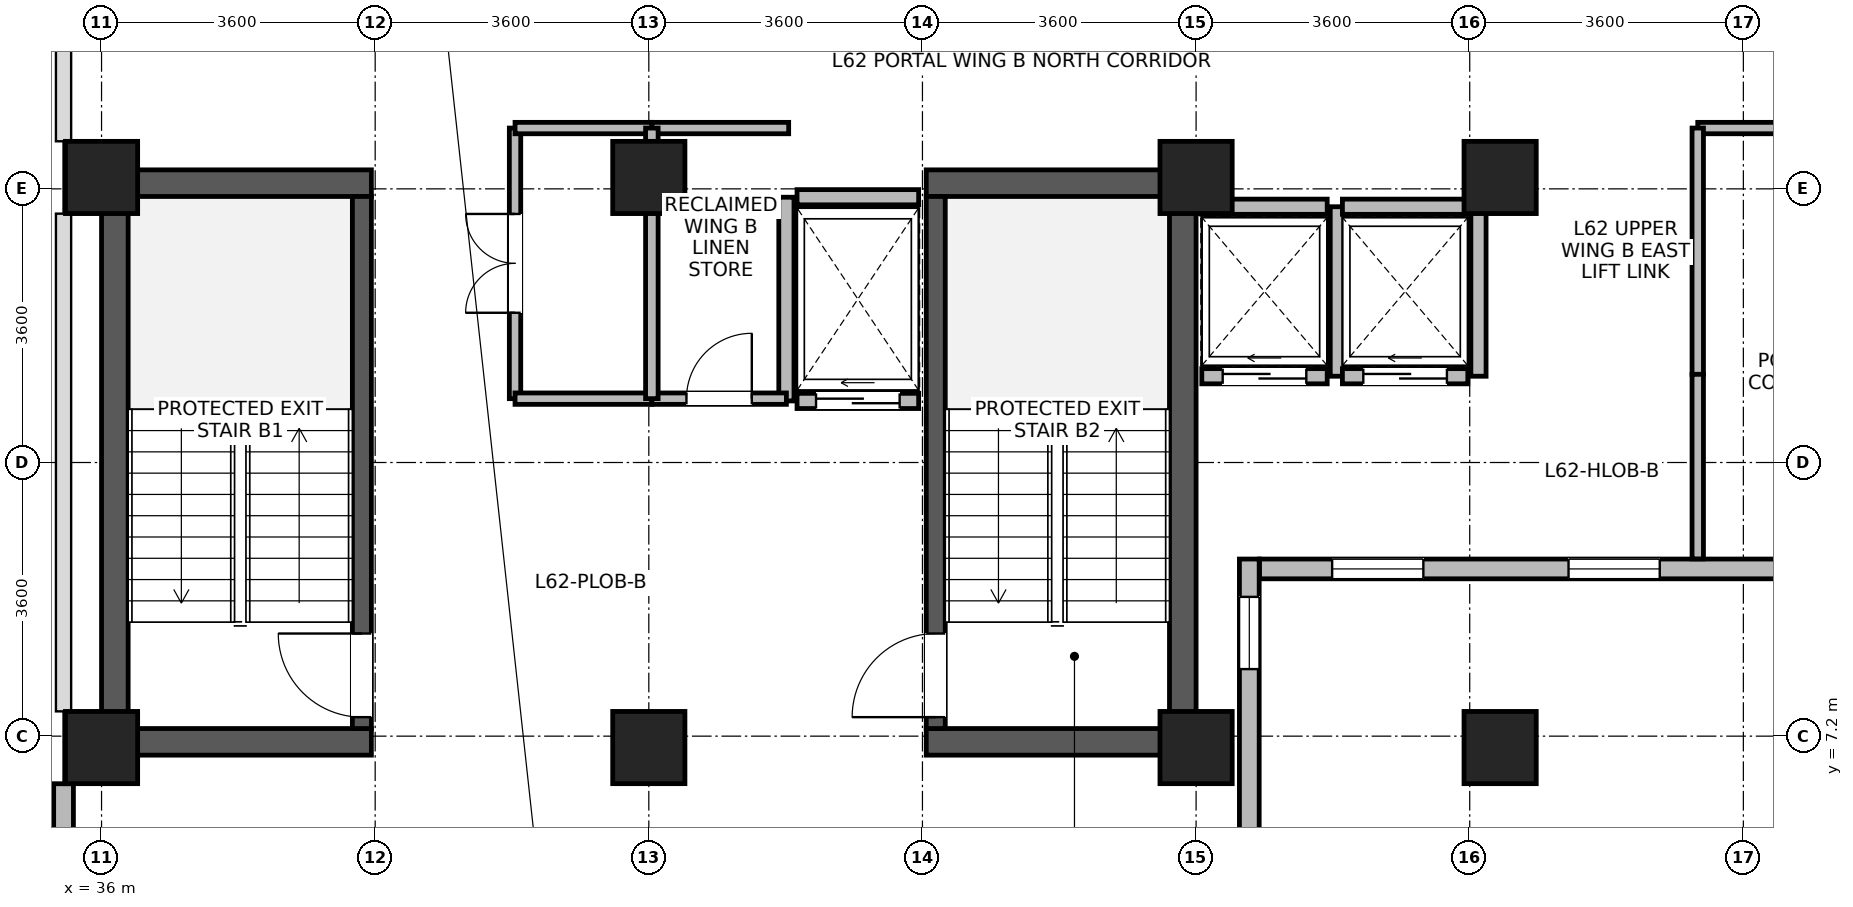
"""IFC4 building model, lengths in metres.
Left out: names, types, materials, properties, quantities, classifications, styles, units other than length and angle.
Written with IfcOpenShell. Run it as: python <this file> out.ifc"""

import sys

from ifc_helpers import new_model, si_unit, direction, frame, frame_2d, origin, origin_2d, place, context, subcontext, project, spatial, rectangle, extrude, source, transform, mapped, element, fill, save


model = new_model("IFC4")
c1 = context("Model", 3, precision=1e-05, world=origin(), true_north=direction((0.0, 1.0)))
c2 = subcontext(c1, "Body", "Model", "MODEL_VIEW")
j1 = project(units=[si_unit("LENGTHUNIT", "METRE"), si_unit("PLANEANGLEUNIT", "RADIAN")], contexts=[c1])
p1 = place(None, origin())
s1 = spatial("IfcSite", under=j1, at=p1, CompositionType="ELEMENT")
p2 = place(p1, origin())
s2 = spatial("IfcBuilding", under=s1, at=p2, CompositionType="ELEMENT")
p3 = place(p2, frame((0.0, 0.0, 242.5)))
s3 = spatial("IfcBuildingStorey", under=s2, at=p3, CompositionType="ELEMENT", Elevation=242.5)
for number, where, z_axis, x_axis in (
    (1, (36.175, 6.95, 0.0), (0.0, 0.0, 1.0), (0.0, 1.0, 0.0)),
    (2, (50.225, 6.95, 0.0), (0.0, 0.0, 1.0), (0.0, 1.0, 0.0)),
):
    element("IfcWall", number, at=place(p3, frame(where, z_axis=z_axis, x_axis=x_axis)), inside=s3, PredefinedType="SHEAR", context=c2, shape_type="SweptSolid", body=[
        extrude(rectangle(XDim=7.7, YDim=0.35, at=frame_2d((3.85, 0.0))), origin(), (0.0, 0.0, 1.0), 3.44),
    ])
for number, where, z_axis, x_axis in (
    (3, (36.35, 7.125, 0.0), (0.0, 0.0, 1.0), (1.0, 0.0, 0.0)),
    (4, (46.85, 7.125, 0.0), (0.0, 0.0, 1.0), (1.0, 0.0, 0.0)),
    (5, (36.35, 14.475, 0.0), (0.0, 0.0, 1.0), (1.0, 0.0, 0.0)),
    (6, (46.85, 14.475, 0.0), (0.0, 0.0, 1.0), (1.0, 0.0, 0.0)),
):
    element("IfcWall", number, at=place(p3, frame(where, z_axis=z_axis, x_axis=x_axis)), inside=s3, PredefinedType="SHEAR", context=c2, shape_type="SweptSolid", body=[
        extrude(rectangle(XDim=3.2, YDim=0.35, at=frame_2d((1.6, 0.0))), origin(), (0.0, 0.0, 1.0), 3.44),
    ])
p4 = place(p3, frame((39.425, 7.3, 0.0), z_axis=(0.0, 0.0, 1.0), x_axis=(0.0, 1.0, 0.0)))
e7 = element("IfcWall", 7, at=p4, inside=s3, PredefinedType="SHEAR", context=c2, shape_type="SweptSolid", body=[
    extrude(rectangle(XDim=7.0, YDim=0.25, at=frame_2d((3.5, 0.0))), origin(), (0.0, 0.0, 1.0), 3.44),
])
p5 = place(p4, frame((0.15, 0.0, 0.0)))
e8 = element("IfcOpeningElement", 8, at=p5, cuts=e7, PredefinedType="OPENING", context=c2, shape_type="SweptSolid", body=[
    extrude(rectangle(XDim=1.1, YDim=2.08, at=frame_2d((0.55, 1.04))), frame((0.0, 0.135, 0.0), z_axis=(0.0, -1.0, 0.0), x_axis=(1.0, 0.0, 0.0)), (0.0, 0.0, 1.0), 0.27),
])
p6 = place(p3, frame((46.975, 7.3, 0.0), z_axis=(0.0, 0.0, 1.0), x_axis=(0.0, 1.0, 0.0)))
e9 = element("IfcWall", 9, at=p6, inside=s3, PredefinedType="SHEAR", context=c2, shape_type="SweptSolid", body=[
    extrude(rectangle(XDim=7.0, YDim=0.25, at=frame_2d((3.5, 0.0))), origin(), (0.0, 0.0, 1.0), 3.44),
])
p7 = place(p6, frame((0.15, 0.0, 0.0)))
e10 = element("IfcOpeningElement", 10, at=p7, cuts=e9, PredefinedType="OPENING", context=c2, shape_type="SweptSolid", body=[
    extrude(rectangle(XDim=1.1, YDim=2.08, at=frame_2d((0.55, 1.04))), frame((0.0, 0.135, 0.0), z_axis=(0.0, -1.0, 0.0), x_axis=(1.0, 0.0, 0.0)), (0.0, 0.0, 1.0), 0.27),
])
m1 = source(origin(), c2, "Body", "SweptSolid", [
    extrude(rectangle(XDim=0.95, YDim=0.95, at=origin_2d()), origin(), (0.0, 0.0, 1.0), 3.7),
])
for number, where, z_axis, x_axis in (
    (11, (36.0, 7.05, 0.0), (0.0, 0.0, 1.0), (1.0, 0.0, 0.0)),
    (12, (36.0, 14.55, 0.0), (0.0, 0.0, 1.0), (1.0, 0.0, 0.0)),
    (13, (43.2, 7.05, 0.0), (0.0, 0.0, 1.0), (1.0, 0.0, 0.0)),
    (14, (43.2, 14.55, 0.0), (0.0, 0.0, 1.0), (1.0, 0.0, 0.0)),
    (15, (50.4, 7.05, 0.0), (0.0, 0.0, 1.0), (1.0, 0.0, 0.0)),
    (16, (50.4, 14.55, 0.0), (0.0, 0.0, 1.0), (1.0, 0.0, 0.0)),
    (17, (54.4, 7.05, 0.0), (0.0, 0.0, 1.0), (1.0, 0.0, 0.0)),
    (18, (54.4, 14.55, 0.0), (0.0, 0.0, 1.0), (1.0, 0.0, 0.0)),
):
    element("IfcColumn", number, at=place(p3, frame(where, z_axis=z_axis, x_axis=x_axis)), inside=s3, PredefinedType="COLUMN", context=c2, shape_type="MappedRepresentation", body=[
        mapped(m1, transform((0.0, 0.0, 0.0), x_axis=(1.0, 0.0, 0.0), y_axis=(0.0, 1.0, 0.0), z_axis=(0.0, 0.0, 1.0), scale=1.0)),
    ])
p8 = place(p3, frame((51.1, 9.53, 0.0), z_axis=(0.0, 0.0, 1.0), x_axis=(0.0, -1.0, 0.0)))
e19 = element("IfcWall", 19, at=p8, inside=s3, PredefinedType="STANDARD", context=c2, shape_type="SweptSolid", body=[
    extrude(rectangle(XDim=3.86, YDim=0.26, at=frame_2d((1.93, 0.0))), origin(), (0.0, 0.0, 1.0), 3.42),
])
p9 = place(p8, frame((0.498, 0.0, 0.85)))
e20 = element("IfcOpeningElement", 20, at=p9, cuts=e19, PredefinedType="OPENING", context=c2, shape_type="SweptSolid", body=[
    extrude(rectangle(XDim=0.95, YDim=1.75, at=frame_2d((0.475, 0.875))), frame((0.0, 0.14, 0.0), z_axis=(0.0, -1.0, 0.0), x_axis=(1.0, 0.0, 0.0)), (0.0, 0.0, 1.0), 0.28),
])
p10 = place(p3, frame((60.565, 9.4, 0.0), z_axis=(0.0, 0.0, 1.0), x_axis=(-1.0, 0.0, 0.0)))
e21 = element("IfcWall", 21, at=p10, inside=s3, PredefinedType="STANDARD", context=c2, shape_type="SweptSolid", body=[
    extrude(rectangle(XDim=9.33, YDim=0.26, at=frame_2d((4.665, 0.0))), origin(), (0.0, 0.0, 1.0), 3.42),
])
p11 = place(p10, frame((0.955, 0.0, 0.85)))
e22 = element("IfcOpeningElement", 22, at=p11, cuts=e21, PredefinedType="OPENING", context=c2, shape_type="SweptSolid", body=[
    extrude(rectangle(XDim=1.2, YDim=1.75, at=frame_2d((0.6, 0.875))), frame((0.0, 0.14, 0.0), z_axis=(0.0, -1.0, 0.0), x_axis=(1.0, 0.0, 0.0)), (0.0, 0.0, 1.0), 0.28),
])
p12 = place(p10, frame((4.065, 0.0, 0.85)))
e23 = element("IfcOpeningElement", 23, at=p12, cuts=e21, PredefinedType="OPENING", context=c2, shape_type="SweptSolid", body=[
    extrude(rectangle(XDim=1.2, YDim=1.75, at=frame_2d((0.6, 0.875))), frame((0.0, 0.14, 0.0), z_axis=(0.0, -1.0, 0.0), x_axis=(1.0, 0.0, 0.0)), (0.0, 0.0, 1.0), 0.28),
])
p13 = place(p10, frame((7.175, 0.0, 0.85)))
e24 = element("IfcOpeningElement", 24, at=p13, cuts=e21, PredefinedType="OPENING", context=c2, shape_type="SweptSolid", body=[
    extrude(rectangle(XDim=1.2, YDim=1.75, at=frame_2d((0.6, 0.875))), frame((0.0, 0.14, 0.0), z_axis=(0.0, -1.0, 0.0), x_axis=(1.0, 0.0, 0.0)), (0.0, 0.0, 1.0), 0.28),
])
p14 = place(p3, frame((35.5, 5.8, 0.0), z_axis=(0.0, 0.0, 1.0), x_axis=(0.0, 1.0, 0.0)))
e25 = element("IfcWall", 25, at=p14, inside=s3, PredefinedType="STANDARD", context=c2, shape_type="SweptSolid", body=[
    extrude(rectangle(XDim=0.774, YDim=0.26, at=frame_2d((0.387, 0.0))), origin(), (0.0, 0.0, 1.0), 3.44),
])
p15 = place(p3, frame((50.475, 11.935, 0.0), z_axis=(0.0, 0.0, 1.0), x_axis=(1.0, 0.0, 0.0)))
e26 = element("IfcWall", 26, at=p15, inside=s3, PredefinedType="PARTITIONING", context=c2, shape_type="SweptSolid", body=[
    extrude(rectangle(XDim=1.65, YDim=0.2, at=frame_2d((0.825, 0.0))), origin(), (0.0, 0.0, 1.0), 3.42),
])
p16 = place(p15, frame((0.275, 0.0, 0.0)))
e27 = element("IfcOpeningElement", 27, at=p16, cuts=e26, PredefinedType="OPENING", context=c2, shape_type="SweptSolid", body=[
    extrude(rectangle(XDim=1.1, YDim=2.12, at=frame_2d((0.55, 1.06))), frame((0.0, 0.11, 0.0), z_axis=(0.0, -1.0, 0.0), x_axis=(1.0, 0.0, 0.0)), (0.0, 0.0, 1.0), 0.22),
])
p17 = place(p3, frame((50.475, 14.165, 0.0), z_axis=(0.0, 0.0, 1.0), x_axis=(1.0, 0.0, 0.0)))
e28 = element("IfcWall", 28, at=p17, inside=s3, PredefinedType="PARTITIONING", context=c2, shape_type="SweptSolid", body=[
    extrude(rectangle(XDim=1.65, YDim=0.2, at=frame_2d((0.825, 0.0))), origin(), (0.0, 0.0, 1.0), 3.42),
])
p18 = place(p3, frame((52.265, 11.935, 0.0), z_axis=(0.0, 0.0, 1.0), x_axis=(0.0, 1.0, 0.0)))
e29 = element("IfcWall", 29, at=p18, inside=s3, PredefinedType="PARTITIONING", context=c2, shape_type="SweptSolid", body=[
    extrude(rectangle(XDim=2.23, YDim=0.2, at=frame_2d((1.115, 0.0))), origin(), (0.0, 0.0, 1.0), 3.42),
])
p19 = place(p3, frame((52.325, 11.935, 0.0), z_axis=(0.0, 0.0, 1.0), x_axis=(1.0, 0.0, 0.0)))
e30 = element("IfcWall", 30, at=p19, inside=s3, PredefinedType="PARTITIONING", context=c2, shape_type="SweptSolid", body=[
    extrude(rectangle(XDim=1.65, YDim=0.2, at=frame_2d((0.825, 0.0))), origin(), (0.0, 0.0, 1.0), 3.42),
])
p20 = place(p19, frame((0.275, 0.0, 0.0)))
e31 = element("IfcOpeningElement", 31, at=p20, cuts=e30, PredefinedType="OPENING", context=c2, shape_type="SweptSolid", body=[
    extrude(rectangle(XDim=1.1, YDim=2.12, at=frame_2d((0.55, 1.06))), frame((0.0, 0.11, 0.0), z_axis=(0.0, -1.0, 0.0), x_axis=(1.0, 0.0, 0.0)), (0.0, 0.0, 1.0), 0.22),
])
p21 = place(p3, frame((52.325, 14.165, 0.0), z_axis=(0.0, 0.0, 1.0), x_axis=(1.0, 0.0, 0.0)))
e32 = element("IfcWall", 32, at=p21, inside=s3, PredefinedType="PARTITIONING", context=c2, shape_type="SweptSolid", body=[
    extrude(rectangle(XDim=1.65, YDim=0.2, at=frame_2d((0.825, 0.0))), origin(), (0.0, 0.0, 1.0), 3.42),
])
p22 = place(p3, frame((54.115, 11.935, 0.0), z_axis=(0.0, 0.0, 1.0), x_axis=(0.0, 1.0, 0.0)))
e33 = element("IfcWall", 33, at=p22, inside=s3, PredefinedType="PARTITIONING", context=c2, shape_type="SweptSolid", body=[
    extrude(rectangle(XDim=2.23, YDim=0.2, at=frame_2d((1.115, 0.0))), origin(), (0.0, 0.0, 1.0), 3.42),
])
p23 = place(p3, frame((45.15, 11.61, 0.0), z_axis=(0.0, 0.0, 1.0), x_axis=(1.0, 0.0, 0.0)))
e34 = element("IfcWall", 34, at=p23, inside=s3, PredefinedType="PARTITIONING", context=c2, shape_type="SweptSolid", body=[
    extrude(rectangle(XDim=1.6, YDim=0.2, at=frame_2d((0.8, 0.0))), origin(), (0.0, 0.0, 1.0), 3.42),
])
p24 = place(p23, frame((0.25, 0.0, 0.0)))
e35 = element("IfcOpeningElement", 35, at=p24, cuts=e34, PredefinedType="OPENING", context=c2, shape_type="SweptSolid", body=[
    extrude(rectangle(XDim=1.1, YDim=2.12, at=frame_2d((0.55, 1.06))), frame((0.0, 0.11, 0.0), z_axis=(0.0, -1.0, 0.0), x_axis=(1.0, 0.0, 0.0)), (0.0, 0.0, 1.0), 0.22),
])
p25 = place(p3, frame((45.15, 14.29, 0.0), z_axis=(0.0, 0.0, 1.0), x_axis=(1.0, 0.0, 0.0)))
e36 = element("IfcWall", 36, at=p25, inside=s3, PredefinedType="PARTITIONING", context=c2, shape_type="SweptSolid", body=[
    extrude(rectangle(XDim=1.6, YDim=0.2, at=frame_2d((0.8, 0.0))), origin(), (0.0, 0.0, 1.0), 2.52),
])
p26 = place(p3, frame((45.01, 11.61, 0.0), z_axis=(0.0, 0.0, 1.0), x_axis=(0.0, 1.0, 0.0)))
e37 = element("IfcWall", 37, at=p26, inside=s3, PredefinedType="PARTITIONING", context=c2, shape_type="SweptSolid", body=[
    extrude(rectangle(XDim=2.68, YDim=0.2, at=frame_2d((1.34, 0.0))), origin(), (0.0, 0.0, 1.0), 3.42),
])
p27 = place(p3, frame((57.0, 15.2, 0.0), z_axis=(0.0, 0.0, 1.0), x_axis=(1.0, 0.0, 0.0)))
e38 = element("IfcWall", 38, at=p27, inside=s3, PredefinedType="PARTITIONING", context=c2, shape_type="SweptSolid", body=[
    extrude(rectangle(XDim=3.568, YDim=0.15, at=frame_2d((1.784, 0.0))), origin(), (0.0, 0.0, 1.0), 3.42),
])
p28 = place(p27, frame((1.309, 0.0, 0.0)))
e39 = element("IfcOpeningElement", 39, at=p28, cuts=e38, PredefinedType="OPENING", context=c2, shape_type="SweptSolid", body=[
    extrude(rectangle(XDim=0.95, YDim=2.1, at=frame_2d((0.475, 1.05))), frame((0.0, 0.085, 0.0), z_axis=(0.0, -1.0, 0.0), x_axis=(1.0, 0.0, 0.0)), (0.0, 0.0, 1.0), 0.17),
])
p29 = place(p3, frame((41.44, 11.64, 0.0), z_axis=(0.0, 0.0, 1.0), x_axis=(0.0, 1.0, 0.0)))
e40 = element("IfcWall", 40, at=p29, inside=s3, PredefinedType="PARTITIONING", context=c2, shape_type="SweptSolid", body=[
    extrude(rectangle(XDim=3.56, YDim=0.15, at=frame_2d((1.78, 0.0))), origin(), (0.0, 0.0, 1.0), 3.42),
])
p30 = place(p29, frame((1.13, 0.0, 0.0)))
e41 = element("IfcOpeningElement", 41, at=p30, cuts=e40, PredefinedType="OPENING", context=c2, shape_type="SweptSolid", body=[
    extrude(rectangle(XDim=1.3, YDim=2.12, at=frame_2d((0.65, 1.06))), frame((0.0, 0.085, 0.0), z_axis=(0.0, -1.0, 0.0), x_axis=(1.0, 0.0, 0.0)), (0.0, 0.0, 1.0), 0.17),
])
p31 = place(p3, frame((57.0, 11.96, 0.0), z_axis=(0.0, 0.0, 1.0), x_axis=(0.0, 1.0, 0.0)))
e42 = element("IfcWall", 42, at=p31, inside=s3, PredefinedType="PARTITIONING", context=c2, shape_type="SweptSolid", body=[
    extrude(rectangle(XDim=3.24, YDim=0.15, at=frame_2d((1.62, 0.0))), origin(), (0.0, 0.0, 1.0), 3.42),
])
p32 = place(p3, frame((57.0, 9.532, 0.0), z_axis=(0.0, 0.0, 1.0), x_axis=(0.0, 1.0, 0.0)))
e43 = element("IfcWall", 43, at=p32, inside=s3, PredefinedType="PARTITIONING", context=c2, shape_type="SweptSolid", body=[
    extrude(rectangle(XDim=2.428, YDim=0.15, at=frame_2d((1.214, 0.0))), origin(), (0.0, 0.0, 1.0), 3.42),
])
for number, where, z_axis, x_axis in (
    (44, (41.44, 11.64, 0.0), (0.0, 0.0, 1.0), (1.0, 0.0, 0.0)),
    (45, (41.44, 15.2, 0.0), (0.0, 0.0, 1.0), (1.0, 0.0, 0.0)),
):
    element("IfcWall", number, at=place(p3, frame(where, z_axis=z_axis, x_axis=x_axis)), inside=s3, PredefinedType="PARTITIONING", context=c2, shape_type="SweptSolid", body=[
        extrude(rectangle(XDim=1.8, YDim=0.15, at=frame_2d((0.9, 0.0))), origin(), (0.0, 0.0, 1.0), 3.42),
    ])
p33 = place(p3, frame((43.24, 11.64, 0.0), z_axis=(0.0, 0.0, 1.0), x_axis=(1.0, 0.0, 0.0)))
e46 = element("IfcWall", 46, at=p33, inside=s3, PredefinedType="PARTITIONING", context=c2, shape_type="SweptSolid", body=[
    extrude(rectangle(XDim=1.77, YDim=0.15, at=frame_2d((0.885, 0.0))), origin(), (0.0, 0.0, 1.0), 3.42),
])
p34 = place(p33, frame((0.455, 0.0, 0.0)))
e47 = element("IfcOpeningElement", 47, at=p34, cuts=e46, PredefinedType="OPENING", context=c2, shape_type="SweptSolid", body=[
    extrude(rectangle(XDim=0.86, YDim=2.02, at=frame_2d((0.43, 1.01))), frame((0.0, 0.085, 0.0), z_axis=(0.0, -1.0, 0.0), x_axis=(1.0, 0.0, 0.0)), (0.0, 0.0, 1.0), 0.17),
])
p35 = place(p3, frame((43.24, 15.2, 0.0), z_axis=(0.0, 0.0, 1.0), x_axis=(1.0, 0.0, 0.0)))
e48 = element("IfcWall", 48, at=p35, inside=s3, PredefinedType="PARTITIONING", context=c2, shape_type="SweptSolid", body=[
    extrude(rectangle(XDim=1.8, YDim=0.15, at=frame_2d((0.9, 0.0))), origin(), (0.0, 0.0, 1.0), 3.42),
])
p36 = place(p3, frame((43.24, 11.64, 0.0), z_axis=(0.0, 0.0, 1.0), x_axis=(0.0, 1.0, 0.0)))
e49 = element("IfcWall", 49, at=p36, inside=s3, PredefinedType="PARTITIONING", context=c2, shape_type="SweptSolid", body=[
    extrude(rectangle(XDim=3.56, YDim=0.165, at=frame_2d((1.78, 0.0))), origin(), (0.0, 0.0, 1.0), 3.42),
])
p37 = place(p9, origin())
e50 = element("IfcWindow", 50, at=p37, inside=s3, PartitioningType="SINGLE_PANEL", PredefinedType="WINDOW", context=c2, shape_type="SweptSolid", body=[
    extrude(rectangle(XDim=0.95, YDim=1.75, at=frame_2d((0.475, 0.875))), frame((0.0, 0.03, 0.0), z_axis=(0.0, -1.0, 0.0), x_axis=(1.0, 0.0, 0.0)), (0.0, 0.0, 1.0), 0.06),
])
fill(e20, e50)
p38 = place(p12, origin())
e51 = element("IfcWindow", 51, at=p38, inside=s3, PartitioningType="SINGLE_PANEL", PredefinedType="WINDOW", context=c2, shape_type="SweptSolid", body=[
    extrude(rectangle(XDim=1.2, YDim=1.75, at=frame_2d((0.6, 0.875))), frame((0.0, 0.03, 0.0), z_axis=(0.0, -1.0, 0.0), x_axis=(1.0, 0.0, 0.0)), (0.0, 0.0, 1.0), 0.06),
])
fill(e23, e51)
p39 = place(p13, origin())
e52 = element("IfcWindow", 52, at=p39, inside=s3, PartitioningType="SINGLE_PANEL", PredefinedType="WINDOW", context=c2, shape_type="SweptSolid", body=[
    extrude(rectangle(XDim=1.2, YDim=1.75, at=frame_2d((0.6, 0.875))), frame((0.0, 0.03, 0.0), z_axis=(0.0, -1.0, 0.0), x_axis=(1.0, 0.0, 0.0)), (0.0, 0.0, 1.0), 0.06),
])
fill(e24, e52)
p40 = place(p5, origin())
e53 = element("IfcDoor", 53, at=p40, inside=s3, OperationType="SINGLE_SWING_RIGHT", PredefinedType="DOOR", context=c2, shape_type="SweptSolid", body=[
    extrude(rectangle(XDim=1.1, YDim=2.08, at=frame_2d((0.55, 1.04))), frame((0.0, 0.025, 0.0), z_axis=(0.0, -1.0, 0.0), x_axis=(1.0, 0.0, 0.0)), (0.0, 0.0, 1.0), 0.05),
])
fill(e8, e53)
p41 = place(p7, origin())
e54 = element("IfcDoor", 54, at=p41, inside=s3, OperationType="SINGLE_SWING_LEFT", PredefinedType="DOOR", context=c2, shape_type="SweptSolid", body=[
    extrude(rectangle(XDim=1.1, YDim=2.08, at=frame_2d((0.55, 1.04))), frame((0.0, 0.025, 0.0), z_axis=(0.0, -1.0, 0.0), x_axis=(1.0, 0.0, 0.0)), (0.0, 0.0, 1.0), 0.05),
])
fill(e10, e54)
p42 = place(p16, origin())
e55 = element("IfcDoor", 55, at=p42, inside=s3, OperationType="SLIDING_TO_LEFT", PredefinedType="DOOR", context=c2, shape_type="SweptSolid", body=[
    extrude(rectangle(XDim=1.1, YDim=2.12, at=frame_2d((0.55, 1.06))), frame((0.0, 0.025, 0.0), z_axis=(0.0, -1.0, 0.0), x_axis=(1.0, 0.0, 0.0)), (0.0, 0.0, 1.0), 0.05),
])
fill(e27, e55)
p43 = place(p20, origin())
e56 = element("IfcDoor", 56, at=p43, inside=s3, OperationType="SLIDING_TO_LEFT", PredefinedType="DOOR", context=c2, shape_type="SweptSolid", body=[
    extrude(rectangle(XDim=1.1, YDim=2.12, at=frame_2d((0.55, 1.06))), frame((0.0, 0.025, 0.0), z_axis=(0.0, -1.0, 0.0), x_axis=(1.0, 0.0, 0.0)), (0.0, 0.0, 1.0), 0.05),
])
fill(e31, e56)
p44 = place(p24, origin())
e57 = element("IfcDoor", 57, at=p44, inside=s3, OperationType="SLIDING_TO_LEFT", PredefinedType="DOOR", context=c2, shape_type="SweptSolid", body=[
    extrude(rectangle(XDim=1.1, YDim=2.12, at=frame_2d((0.55, 1.06))), frame((0.0, 0.025, 0.0), z_axis=(0.0, -1.0, 0.0), x_axis=(1.0, 0.0, 0.0)), (0.0, 0.0, 1.0), 0.05),
])
fill(e35, e57)
p45 = place(p30, origin())
e58 = element("IfcDoor", 58, at=p45, inside=s3, OperationType="DOUBLE_DOOR_SINGLE_SWING", PredefinedType="DOOR", context=c2, shape_type="SweptSolid", body=[
    extrude(rectangle(XDim=1.3, YDim=2.12, at=frame_2d((0.65, 1.06))), frame((0.0, 0.025, 0.0), z_axis=(0.0, -1.0, 0.0), x_axis=(1.0, 0.0, 0.0)), (0.0, 0.0, 1.0), 0.05),
])
fill(e41, e58)
p46 = place(p34, origin())
e59 = element("IfcDoor", 59, at=p46, inside=s3, OperationType="SINGLE_SWING_RIGHT", PredefinedType="DOOR", context=c2, shape_type="SweptSolid", body=[
    extrude(rectangle(XDim=0.86, YDim=2.02, at=frame_2d((0.43, 1.01))), frame((0.0, 0.025, 0.0), z_axis=(0.0, -1.0, 0.0), x_axis=(1.0, 0.0, 0.0)), (0.0, 0.0, 1.0), 0.05),
])
fill(e47, e59)
save(model, sys.argv[1])
